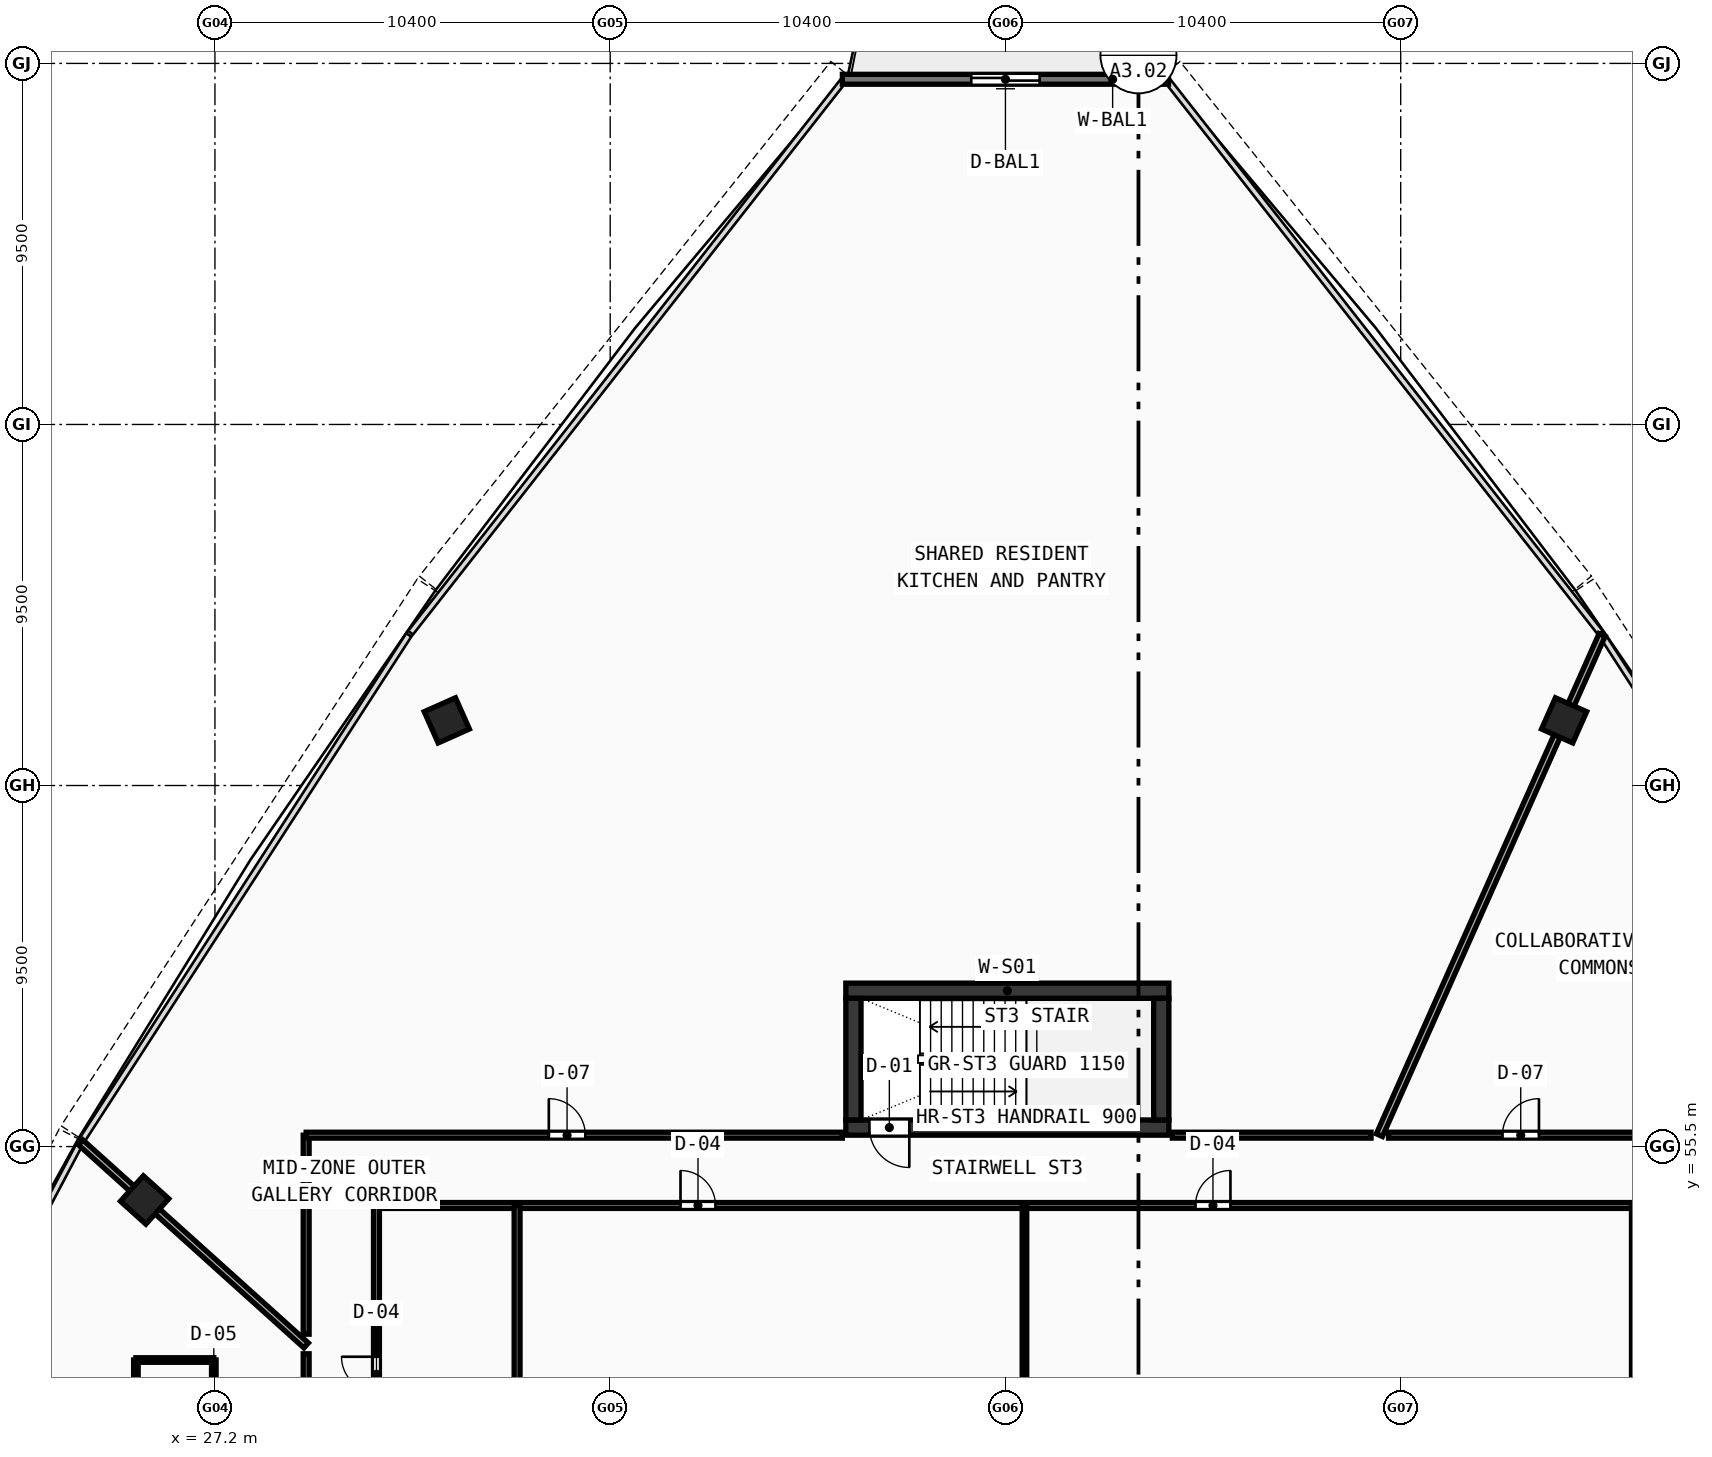
"""IFC4 building model, lengths in metres.
Left out: names, types, materials, properties, quantities, classifications, styles, units other than length and angle.
Written with IfcOpenShell. Run it as: python <this file> out.ifc"""

import sys

from ifc_helpers import new_model, si_unit, direction, frame, frame_2d, origin, origin_with_axes, origin_2d, place, context, subcontext, project, spatial, rectangle, hollow_rectangle, extrude, source, transform, mapped, element, fill, save


model = new_model("IFC4")
c1 = context("Model", 3, precision=1e-05, world=origin(), true_north=direction((0.0, 1.0)))
c2 = subcontext(c1, "Body", "Model", "MODEL_VIEW")
j1 = project(units=[si_unit("LENGTHUNIT", "METRE"), si_unit("PLANEANGLEUNIT", "RADIAN")], contexts=[c1])
p1 = place(None, origin())
s1 = spatial("IfcSite", under=j1, at=p1, CompositionType="ELEMENT")
p2 = place(p1, origin())
s2 = spatial("IfcBuilding", under=s1, at=p2, CompositionType="ELEMENT")
p3 = place(p2, frame((0.0, 0.0, 180.96)))
s3 = spatial("IfcBuildingStorey", under=s2, at=p3, CompositionType="ELEMENT", Elevation=180.96)
p4 = place(p3, frame((43.8, 59.6, 0.0), z_axis=(0.0, 0.0, 1.0), x_axis=(1.0, 0.0, 0.0)))
e1 = element("IfcWall", 1, at=p4, inside=s3, PredefinedType="SHEAR", context=c2, shape_type="SweptSolid", body=[
    extrude(rectangle(XDim=8.5, YDim=0.4, at=frame_2d((4.25, 0.0))), origin(), (0.0, 0.0, 1.0), 3.54),
])
p5 = place(p3, frame((43.8, 56.0, 0.0), z_axis=(0.0, 0.0, 1.0), x_axis=(1.0, 0.0, 0.0)))
e2 = element("IfcWall", 2, at=p5, inside=s3, PredefinedType="SHEAR", context=c2, shape_type="SweptSolid", body=[
    extrude(rectangle(XDim=8.5, YDim=0.4, at=frame_2d((4.25, 0.0))), origin(), (0.0, 0.0, 1.0), 3.54),
])
p6 = place(p5, frame((0.62, 0.0, 0.0)))
e3 = element("IfcOpeningElement", 3, at=p6, cuts=e2, PredefinedType="OPENING", context=c2, shape_type="SweptSolid", body=[
    extrude(rectangle(XDim=1.05, YDim=2.1, at=frame_2d((0.525, 1.05))), frame((0.0, 0.21, 0.0), z_axis=(0.0, -1.0, 0.0), x_axis=(1.0, 0.0, 0.0)), (0.0, 0.0, 1.0), 0.42),
])
for number, where, z_axis, x_axis in (
    (4, (44.0, 56.2, 0.0), (0.0, 0.0, 1.0), (0.0, 1.0, 0.0)),
    (5, (52.1, 56.2, 0.0), (0.0, 0.0, 1.0), (0.0, 1.0, 0.0)),
):
    element("IfcWall", number, at=place(p3, frame(where, z_axis=z_axis, x_axis=x_axis)), inside=s3, PredefinedType="SHEAR", context=c2, shape_type="SweptSolid", body=[
        extrude(rectangle(XDim=3.2, YDim=0.4, at=frame_2d((1.6, 0.0))), origin(), (0.0, 0.0, 1.0), 3.54),
    ])
m1 = source(origin(), c2, "Body", "SweptSolid", [
    extrude(hollow_rectangle(XDim=0.9, YDim=0.9, WallThickness=0.036, at=origin_2d()), origin(), (0.0, 0.0, 1.0), 3.8),
])
for number, where, z_axis, x_axis in (
    (6, (62.699, 66.715, -0.26), (0.0, 0.0, 1.0), (-0.914, 0.407, 0.0)),
    (7, (33.301, 66.715, -0.26), (0.0, 0.0, 1.0), (-0.914, -0.407, 0.0)),
    (8, (25.349, 54.095, -0.26), (0.0, 0.0, 1.0), (-0.669, -0.743, 0.0)),
):
    element("IfcColumn", number, at=place(p3, frame(where, z_axis=z_axis, x_axis=x_axis)), inside=s3, PredefinedType="COLUMN", context=c2, shape_type="MappedRepresentation", body=[
        mapped(m1, transform((0.0, 0.0, 0.0), scale=1.0)),
    ])
p7 = place(p3, frame((52.29, 83.583, 0.0), z_axis=(0.0, 0.0, 1.0), x_axis=(-1.0, 0.0, 0.0)))
e9 = element("IfcWall", 9, at=p7, inside=s3, PredefinedType="STANDARD", context=c2, shape_type="SweptSolid", body=[
    extrude(rectangle(XDim=8.581, YDim=0.26, at=frame_2d((4.29, 0.0))), origin(), (0.0, 0.0, 1.0), 3.54),
])
p8 = place(p7, frame((3.39, 0.0, 0.0)))
e10 = element("IfcOpeningElement", 10, at=p8, cuts=e9, PredefinedType="OPENING", context=c2, shape_type="SweptSolid", body=[
    extrude(rectangle(XDim=1.8, YDim=2.15, at=frame_2d((0.9, 1.075))), frame((0.0, 0.14, 0.0), z_axis=(0.0, -1.0, 0.0), x_axis=(1.0, 0.0, 0.0)), (0.0, 0.0, 1.0), 0.28),
])
p9 = place(p3, frame((31.45, 53.95, 0.0), z_axis=(0.0, 0.0, 1.0), x_axis=(1.0, 0.0, 0.0)))
e11 = element("IfcWall", 11, at=p9, inside=s3, PredefinedType="PARTITIONING", context=c2, shape_type="SweptSolid", body=[
    extrude(rectangle(XDim=33.1, YDim=0.155, at=frame_2d((16.55, 0.0))), origin(), (0.0, 0.0, 1.0), 2.89),
])
p10 = place(p9, frame((8.0, 0.0, 0.0)))
e12 = element("IfcOpeningElement", 12, at=p10, cuts=e11, PredefinedType="OPENING", context=c2, shape_type="SweptSolid", body=[
    extrude(rectangle(XDim=0.92, YDim=2.1, at=frame_2d((0.46, 1.05))), frame((0.0, 0.087, 0.0), z_axis=(0.0, -1.0, 0.0), x_axis=(1.0, 0.0, 0.0)), (0.0, 0.0, 1.0), 0.175),
])
p11 = place(p9, frame((21.55, 0.0, 0.0)))
e13 = element("IfcOpeningElement", 13, at=p11, cuts=e11, PredefinedType="OPENING", context=c2, shape_type="SweptSolid", body=[
    extrude(rectangle(XDim=0.92, YDim=2.1, at=frame_2d((0.46, 1.05))), frame((0.0, 0.087, 0.0), z_axis=(0.0, -1.0, 0.0), x_axis=(1.0, 0.0, 0.0)), (0.0, 0.0, 1.0), 0.175),
])
p12 = place(p3, frame((31.45, 42.25, 0.0), z_axis=(0.0, 0.0, 1.0), x_axis=(0.0, 1.0, 0.0)))
e14 = element("IfcWall", 14, at=p12, inside=s3, PredefinedType="PARTITIONING", context=c2, shape_type="SweptSolid", body=[
    extrude(rectangle(XDim=11.7, YDim=0.155, at=frame_2d((5.85, 0.0))), origin(), (0.0, 0.0, 1.0), 2.89),
])
p13 = place(p12, frame((1.4, 0.0, 0.0)))
e15 = element("IfcOpeningElement", 15, at=p13, cuts=e14, PredefinedType="OPENING", context=c2, shape_type="SweptSolid", body=[
    extrude(rectangle(XDim=0.94, YDim=2.1, at=frame_2d((0.47, 1.05))), frame((0.0, 0.087, 0.0), z_axis=(0.0, -1.0, 0.0), x_axis=(1.0, 0.0, 0.0)), (0.0, 0.0, 1.0), 0.175),
])
p14 = place(p12, frame((6.8, 0.0, 0.0)))
e16 = element("IfcOpeningElement", 16, at=p14, cuts=e14, PredefinedType="OPENING", context=c2, shape_type="SweptSolid", body=[
    extrude(rectangle(XDim=0.92, YDim=2.1, at=frame_2d((0.46, 1.05))), frame((0.0, 0.087, 0.0), z_axis=(0.0, -1.0, 0.0), x_axis=(1.0, 0.0, 0.0)), (0.0, 0.0, 1.0), 0.175),
])
for number, where, z_axis, x_axis in (
    (17, (64.55, 42.25, 0.0), (0.0, 0.0, 1.0), (0.0, 1.0, 0.0)),
    (18, (35.15, 42.25, 0.0), (0.0, 0.0, 1.0), (0.0, 1.0, 0.0)),
):
    element("IfcWall", number, at=place(p3, frame(where, z_axis=z_axis, x_axis=x_axis)), inside=s3, PredefinedType="PARTITIONING", context=c2, shape_type="SweptSolid", body=[
        extrude(rectangle(XDim=11.7, YDim=0.155, at=frame_2d((5.85, 0.0))), origin(), (0.0, 0.0, 1.0), 2.89),
    ])
p15 = place(p3, frame((48.5, 42.25, 0.0), z_axis=(0.0, 0.0, 1.0), x_axis=(0.0, 1.0, 0.0)))
e19 = element("IfcWall", 19, at=p15, inside=s3, PredefinedType="PARTITIONING", context=c2, shape_type="SweptSolid", body=[
    extrude(rectangle(XDim=11.7, YDim=0.12, at=frame_2d((5.85, 0.0))), origin(), (0.0, 0.0, 1.0), 3.14),
])
p16 = place(p3, frame((57.84, 55.8, 0.0), z_axis=(0.0, 0.0, 1.0), x_axis=(0.40674529891, 0.913541603768, 0.0)))
e20 = element("IfcWall", 20, at=p16, inside=s3, PredefinedType="PARTITIONING", context=c2, shape_type="SweptSolid", body=[
    extrude(rectangle(XDim=14.407, YDim=0.175, at=frame_2d((7.203, 0.0))), origin(), (0.0, 0.0, 1.0), 2.89),
])
p17 = place(p3, frame((29.6, 50.267, 0.0), z_axis=(0.0, 0.0, 1.0), x_axis=(-0.743139097079, 0.669136968335, 0.0)))
e21 = element("IfcWall", 21, at=p17, inside=s3, PredefinedType="PARTITIONING", context=c2, shape_type="SweptSolid", body=[
    extrude(rectangle(XDim=7.987, YDim=0.175, at=frame_2d((3.994, 0.0))), origin(), (0.0, 0.0, 1.0), 2.89),
])
p18 = place(p3, frame((29.6, 43.733, 0.0), z_axis=(0.0, 0.0, 1.0), x_axis=(0.0, 1.0, 0.0)))
e22 = element("IfcWall", 22, at=p18, inside=s3, PredefinedType="PARTITIONING", context=c2, shape_type="SweptSolid", body=[
    extrude(rectangle(XDim=6.315, YDim=0.155, at=frame_2d((3.157, 0.0))), origin(), (0.0, 0.0, 1.0), 2.89),
])
p19 = place(p18, frame((2.668, 0.0, 0.0)))
e23 = element("IfcOpeningElement", 23, at=p19, cuts=e22, PredefinedType="OPENING", context=c2, shape_type="SweptSolid", body=[
    extrude(rectangle(XDim=0.96, YDim=2.12, at=frame_2d((0.48, 1.06))), frame((0.0, 0.087, 0.0), z_axis=(0.0, -1.0, 0.0), x_axis=(1.0, 0.0, 0.0)), (0.0, 0.0, 1.0), 0.175),
])
p20 = place(p3, frame((29.6, 50.563, 0.0), z_axis=(0.0, 0.0, 1.0), x_axis=(0.0, 1.0, 0.0)))
e24 = element("IfcWall", 24, at=p20, inside=s3, PredefinedType="PARTITIONING", context=c2, shape_type="SweptSolid", body=[
    extrude(rectangle(XDim=5.237, YDim=0.155, at=frame_2d((2.618, 0.0))), origin(), (0.0, 0.0, 1.0), 3.54),
])
p21 = place(p3, frame((29.6, 55.8, 0.0), z_axis=(0.0, 0.0, 1.0), x_axis=(1.0, 0.0, 0.0)))
e25 = element("IfcWall", 25, at=p21, inside=s3, PredefinedType="PARTITIONING", context=c2, shape_type="SweptSolid", body=[
    extrude(rectangle(XDim=14.109, YDim=0.155, at=frame_2d((7.054, 0.0))), origin(), (0.0, 0.0, 1.0), 2.89),
])
p22 = place(p21, frame((6.385, 0.0, 0.0)))
e26 = element("IfcOpeningElement", 26, at=p22, cuts=e25, PredefinedType="OPENING", context=c2, shape_type="SweptSolid", body=[
    extrude(rectangle(XDim=0.96, YDim=2.12, at=frame_2d((0.48, 1.06))), frame((0.0, 0.087, 0.0), z_axis=(0.0, -1.0, 0.0), x_axis=(1.0, 0.0, 0.0)), (0.0, 0.0, 1.0), 0.175),
])
p23 = place(p3, frame((52.391, 55.8, 0.0), z_axis=(0.0, 0.0, 1.0), x_axis=(1.0, 0.0, 0.0)))
e27 = element("IfcWall", 27, at=p23, inside=s3, PredefinedType="PARTITIONING", context=c2, shape_type="SweptSolid", body=[
    extrude(rectangle(XDim=5.229, YDim=0.155, at=frame_2d((2.614, 0.0))), origin(), (0.0, 0.0, 1.0), 2.89),
])
p24 = place(p3, frame((58.08, 55.8, 0.0), z_axis=(0.0, 0.0, 1.0), x_axis=(1.0, 0.0, 0.0)))
e28 = element("IfcWall", 28, at=p24, inside=s3, PredefinedType="PARTITIONING", context=c2, shape_type="SweptSolid", body=[
    extrude(rectangle(XDim=6.966, YDim=0.155, at=frame_2d((3.483, 0.0))), origin(), (0.0, 0.0, 1.0), 3.14),
])
p25 = place(p24, frame((2.998, 0.0, 0.0)))
e29 = element("IfcOpeningElement", 29, at=p25, cuts=e28, PredefinedType="OPENING", context=c2, shape_type="SweptSolid", body=[
    extrude(rectangle(XDim=0.96, YDim=2.12, at=frame_2d((0.48, 1.06))), frame((0.0, 0.087, 0.0), z_axis=(0.0, -1.0, 0.0), x_axis=(1.0, 0.0, 0.0)), (0.0, 0.0, 1.0), 0.175),
])
p26 = place(p3, frame((27.17, 47.984, 0.0), z_axis=(0.0, 0.0, 1.0), x_axis=(0.0, 1.0, 0.0)))
e30 = element("IfcWall", 30, at=p26, inside=s3, PredefinedType="PARTITIONING", context=c2, shape_type="SweptSolid", body=[
    extrude(rectangle(XDim=1.9, YDim=0.12, at=frame_2d((0.95, 0.0))), origin(), (0.0, 0.0, 1.0), 3.54),
])
p27 = place(p26, frame((0.525, 0.0, 0.0)))
e31 = element("IfcOpeningElement", 31, at=p27, cuts=e30, PredefinedType="OPENING", context=c2, shape_type="SweptSolid", body=[
    extrude(rectangle(XDim=0.85, YDim=2.1, at=frame_2d((0.425, 1.05))), frame((0.0, 0.07, 0.0), z_axis=(0.0, -1.0, 0.0), x_axis=(1.0, 0.0, 0.0)), (0.0, 0.0, 1.0), 0.14),
])
p28 = place(p3, frame((27.17, 49.884, 0.0), z_axis=(0.0, 0.0, 1.0), x_axis=(-1.0, 0.0, 0.0)))
e32 = element("IfcWall", 32, at=p28, inside=s3, PredefinedType="PARTITIONING", context=c2, shape_type="SweptSolid", body=[
    extrude(rectangle(XDim=2.05, YDim=0.12, at=frame_2d((1.025, 0.0))), origin(), (0.0, 0.0, 1.0), 3.54),
])
p29 = place(p3, frame((25.12, 49.884, 0.0), z_axis=(0.0, 0.0, 1.0), x_axis=(0.0, -1.0, 0.0)))
e33 = element("IfcWall", 33, at=p29, inside=s3, PredefinedType="PARTITIONING", context=c2, shape_type="SweptSolid", body=[
    extrude(rectangle(XDim=1.9, YDim=0.12, at=frame_2d((0.95, 0.0))), origin(), (0.0, 0.0, 1.0), 3.54),
])
m2 = source(origin(), c2, "Body", "SweptSolid", [
    extrude(rectangle(XDim=1.8, YDim=2.15, at=frame_2d((0.9, 1.075))), frame((0.0, 0.025, 0.0), z_axis=(0.0, -1.0, 0.0), x_axis=(1.0, 0.0, 0.0)), (0.0, 0.0, 1.0), 0.05),
])
p30 = place(p8, origin_with_axes())
e34 = element("IfcDoor", 34, at=p30, inside=s3, OperationType="DOUBLE_DOOR_SLIDING", PredefinedType="DOOR", context=c2, shape_type="MappedRepresentation", body=[
    mapped(m2, transform((0.0, 0.0, 0.0), scale=1.0)),
])
fill(e10, e34)
m3 = source(origin(), c2, "Body", "SweptSolid", [
    extrude(rectangle(XDim=1.05, YDim=2.1, at=frame_2d((0.525, 1.05))), frame((0.0, 0.025, 0.0), z_axis=(0.0, -1.0, 0.0), x_axis=(1.0, 0.0, 0.0)), (0.0, 0.0, 1.0), 0.05),
])
p31 = place(p6, frame((1.05, 0.0, 0.0), z_axis=(0.0, 0.0, 1.0), x_axis=(-1.0, 0.0, 0.0)))
e35 = element("IfcDoor", 35, at=p31, inside=s3, OperationType="SINGLE_SWING_LEFT", PredefinedType="DOOR", context=c2, shape_type="MappedRepresentation", body=[
    mapped(m3, transform((0.0, 0.0, 0.0), scale=1.0)),
])
fill(e3, e35)
m4 = source(origin(), c2, "Body", "SweptSolid", [
    extrude(rectangle(XDim=0.92, YDim=2.1, at=frame_2d((0.46, 1.05))), frame((0.0, 0.025, 0.0), z_axis=(0.0, -1.0, 0.0), x_axis=(1.0, 0.0, 0.0)), (0.0, 0.0, 1.0), 0.05),
])
p32 = place(p14, origin_with_axes())
e36 = element("IfcDoor", 36, at=p32, inside=s3, OperationType="SINGLE_SWING_RIGHT", PredefinedType="DOOR", context=c2, shape_type="MappedRepresentation", body=[
    mapped(m4, transform((0.0, 0.0, 0.0), scale=1.0)),
])
fill(e16, e36)
p33 = place(p10, origin_with_axes())
e37 = element("IfcDoor", 37, at=p33, inside=s3, OperationType="SINGLE_SWING_LEFT", PredefinedType="DOOR", context=c2, shape_type="MappedRepresentation", body=[
    mapped(m4, transform((0.0, 0.0, 0.0), scale=1.0)),
])
fill(e12, e37)
p34 = place(p11, origin_with_axes())
e38 = element("IfcDoor", 38, at=p34, inside=s3, OperationType="SINGLE_SWING_RIGHT", PredefinedType="DOOR", context=c2, shape_type="MappedRepresentation", body=[
    mapped(m4, transform((0.0, 0.0, 0.0), scale=1.0)),
])
fill(e13, e38)
m5 = source(origin(), c2, "Body", "SweptSolid", [
    extrude(rectangle(XDim=0.96, YDim=2.12, at=frame_2d((0.48, 1.06))), frame((0.0, 0.025, 0.0), z_axis=(0.0, -1.0, 0.0), x_axis=(1.0, 0.0, 0.0)), (0.0, 0.0, 1.0), 0.05),
])
p35 = place(p25, origin_with_axes())
e39 = element("IfcDoor", 39, at=p35, inside=s3, OperationType="SINGLE_SWING_RIGHT", PredefinedType="DOOR", context=c2, shape_type="MappedRepresentation", body=[
    mapped(m5, transform((0.0, 0.0, 0.0), scale=1.0)),
])
fill(e29, e39)
p36 = place(p22, origin_with_axes())
e40 = element("IfcDoor", 40, at=p36, inside=s3, OperationType="SINGLE_SWING_LEFT", PredefinedType="DOOR", context=c2, shape_type="MappedRepresentation", body=[
    mapped(m5, transform((0.0, 0.0, 0.0), scale=1.0)),
])
fill(e26, e40)
save(model, sys.argv[1])
